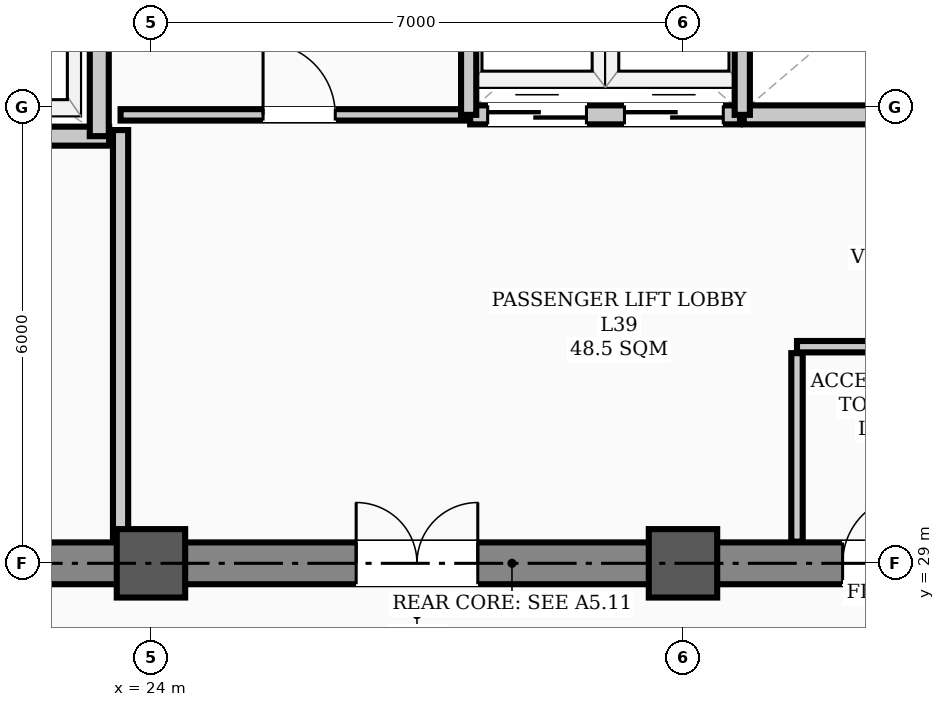
"""IFC4 building model, lengths in metres.
Left out: names, types, materials, properties, quantities, classifications, styles, units other than length and angle.
Written with IfcOpenShell. Run it as: python <this file> out.ifc"""

import sys

from ifc_helpers import new_model, si_unit, direction, frame, frame_2d, origin, origin_2d, place, context, subcontext, project, spatial, rectangle, hollow_rectangle, extrude, element, fill, save


model = new_model("IFC4")
c1 = context("Model", 3, precision=1e-05, world=origin(), true_north=direction((0.0, 1.0)))
c2 = subcontext(c1, "Body", "Model", "MODEL_VIEW")
j1 = project(units=[si_unit("LENGTHUNIT", "METRE"), si_unit("PLANEANGLEUNIT", "RADIAN")], contexts=[c1])
p1 = place(None, origin())
s1 = spatial("IfcSite", under=j1, at=p1, CompositionType="ELEMENT")
p2 = place(p1, origin())
s2 = spatial("IfcBuilding", under=s1, at=p2, CompositionType="ELEMENT")
p3 = place(p2, frame((0.0, 0.0, 157.8)))
s3 = spatial("IfcBuildingStorey", under=s2, at=p3, CompositionType="ELEMENT", Elevation=157.8)
for number, where, z_axis, x_axis in (
    (1, (24.0, 29.0, 0.0), (0.0, 0.0, 1.0), (1.0, 0.0, 0.0)),
    (2, (31.0, 29.0, 0.0), (0.0, 0.0, 1.0), (1.0, 0.0, 0.0)),
):
    element("IfcColumn", number, at=place(p3, frame(where, z_axis=z_axis, x_axis=x_axis)), inside=s3, PredefinedType="COLUMN", context=c2, shape_type="SweptSolid", body=[
        extrude(hollow_rectangle(XDim=0.9, YDim=0.9, WallThickness=0.035, InnerFilletRadius=0.017, OuterFilletRadius=0.052, at=origin_2d()), origin(), (0.0, 0.0, 1.0), 3.9),
    ])
p4 = place(p3, frame((13.5, 29.0, 0.0), z_axis=(0.0, 0.0, 1.0), x_axis=(1.0, 0.0, 0.0)))
e3 = element("IfcWall", 3, at=p4, inside=s3, PredefinedType="SHEAR", context=c2, shape_type="SweptSolid", body=[
    extrude(rectangle(XDim=30.5, YDim=0.55, at=frame_2d((15.25, 0.0))), origin(), (0.0, 0.0, 1.0), 3.72),
])
p5 = place(p4, frame((1.75, 0.0, 0.0)))
e4 = element("IfcOpeningElement", 4, at=p5, cuts=e3, PredefinedType="OPENING", context=c2, shape_type="SweptSolid", body=[
    extrude(rectangle(XDim=1.1, YDim=2.08, at=frame_2d((0.55, 1.04))), frame((0.0, 0.285, 0.0), z_axis=(0.0, -1.0, 0.0), x_axis=(1.0, 0.0, 0.0)), (0.0, 0.0, 1.0), 0.57),
])
p6 = place(p4, frame((26.7, 0.0, 0.0)))
e5 = element("IfcOpeningElement", 5, at=p6, cuts=e3, PredefinedType="OPENING", context=c2, shape_type="SweptSolid", body=[
    extrude(rectangle(XDim=1.1, YDim=2.08, at=frame_2d((0.55, 1.04))), frame((0.0, 0.285, 0.0), z_axis=(0.0, -1.0, 0.0), x_axis=(1.0, 0.0, 0.0)), (0.0, 0.0, 1.0), 0.57),
])
p7 = place(p4, frame((6.8, 0.0, 0.0)))
e6 = element("IfcOpeningElement", 6, at=p7, cuts=e3, PredefinedType="OPENING", context=c2, shape_type="SweptSolid", body=[
    extrude(rectangle(XDim=1.1, YDim=2.08, at=frame_2d((0.55, 1.04))), frame((0.0, 0.285, 0.0), z_axis=(0.0, -1.0, 0.0), x_axis=(1.0, 0.0, 0.0)), (0.0, 0.0, 1.0), 0.57),
])
p8 = place(p4, frame((13.2, 0.0, 0.0)))
e7 = element("IfcOpeningElement", 7, at=p8, cuts=e3, PredefinedType="OPENING", context=c2, shape_type="SweptSolid", body=[
    extrude(rectangle(XDim=1.6, YDim=2.08, at=frame_2d((0.8, 1.04))), frame((0.0, 0.285, 0.0), z_axis=(0.0, -1.0, 0.0), x_axis=(1.0, 0.0, 0.0)), (0.0, 0.0, 1.0), 0.57),
])
p9 = place(p4, frame((19.6, 0.0, 0.0)))
e8 = element("IfcOpeningElement", 8, at=p9, cuts=e3, PredefinedType="OPENING", context=c2, shape_type="SweptSolid", body=[
    extrude(rectangle(XDim=0.9, YDim=2.08, at=frame_2d((0.45, 1.04))), frame((0.0, 0.285, 0.0), z_axis=(0.0, -1.0, 0.0), x_axis=(1.0, 0.0, 0.0)), (0.0, 0.0, 1.0), 0.57),
])
p10 = place(p4, frame((21.6, 0.0, 0.0)))
e9 = element("IfcOpeningElement", 9, at=p10, cuts=e3, PredefinedType="OPENING", context=c2, shape_type="SweptSolid", body=[
    extrude(rectangle(XDim=0.9, YDim=2.08, at=frame_2d((0.45, 1.04))), frame((0.0, 0.285, 0.0), z_axis=(0.0, -1.0, 0.0), x_axis=(1.0, 0.0, 0.0)), (0.0, 0.0, 1.0), 0.57),
])
p11 = place(p3, frame((18.1, 34.62, 0.0), z_axis=(0.0, 0.0, 1.0), x_axis=(1.0, 0.0, 0.0)))
e10 = element("IfcWall", 10, at=p11, inside=s3, PredefinedType="STANDARD", context=c2, shape_type="SweptSolid", body=[
    extrude(rectangle(XDim=5.35, YDim=0.25, at=frame_2d((2.675, 0.0))), origin(), (0.0, 0.0, 1.0), 3.72),
])
p12 = place(p11, frame((0.85, 0.0, 0.0)))
e11 = element("IfcOpeningElement", 11, at=p12, cuts=e10, PredefinedType="OPENING", context=c2, shape_type="SweptSolid", body=[
    extrude(rectangle(XDim=1.1, YDim=2.08, at=frame_2d((0.55, 1.04))), frame((0.0, 0.135, 0.0), z_axis=(0.0, -1.0, 0.0), x_axis=(1.0, 0.0, 0.0)), (0.0, 0.0, 1.0), 0.27),
])
p13 = place(p11, frame((3.45, 0.0, 0.0)))
e12 = element("IfcOpeningElement", 12, at=p13, cuts=e10, PredefinedType="OPENING", context=c2, shape_type="SweptSolid", body=[
    extrude(rectangle(XDim=1.1, YDim=2.08, at=frame_2d((0.55, 1.04))), frame((0.0, 0.135, 0.0), z_axis=(0.0, -1.0, 0.0), x_axis=(1.0, 0.0, 0.0)), (0.0, 0.0, 1.0), 0.27),
])
p14 = place(p3, frame((23.32, 34.62, 0.0), z_axis=(0.0, 0.0, 1.0), x_axis=(0.0, 1.0, 0.0)))
e13 = element("IfcWall", 13, at=p14, inside=s3, PredefinedType="STANDARD", context=c2, shape_type="SweptSolid", body=[
    extrude(rectangle(XDim=3.33, YDim=0.25, at=frame_2d((1.665, 0.0))), origin(), (0.0, 0.0, 1.0), 3.35),
])
p15 = place(p3, frame((28.2, 34.9, 0.0), z_axis=(0.0, 0.0, 1.0), x_axis=(1.0, 0.0, 0.0)))
e14 = element("IfcWall", 14, at=p15, inside=s3, PredefinedType="STANDARD", context=c2, shape_type="SweptSolid", body=[
    extrude(rectangle(XDim=3.55, YDim=0.25, at=frame_2d((1.775, 0.0))), origin(), (0.0, 0.0, 1.0), 3.72),
])
p16 = place(p15, frame((0.23, 0.0, 0.0)))
e15 = element("IfcOpeningElement", 15, at=p16, cuts=e14, PredefinedType="OPENING", context=c2, shape_type="SweptSolid", body=[
    extrude(rectangle(XDim=1.3, YDim=2.08, at=frame_2d((0.65, 1.04))), frame((0.0, 0.135, 0.0), z_axis=(0.0, -1.0, 0.0), x_axis=(1.0, 0.0, 0.0)), (0.0, 0.0, 1.0), 0.27),
])
p17 = place(p15, frame((2.03, 0.0, 0.0)))
e16 = element("IfcOpeningElement", 16, at=p17, cuts=e14, PredefinedType="OPENING", context=c2, shape_type="SweptSolid", body=[
    extrude(rectangle(XDim=1.3, YDim=2.08, at=frame_2d((0.65, 1.04))), frame((0.0, 0.135, 0.0), z_axis=(0.0, -1.0, 0.0), x_axis=(1.0, 0.0, 0.0)), (0.0, 0.0, 1.0), 0.27),
])
p18 = place(p3, frame((31.8, 34.9, 0.0), z_axis=(0.0, 0.0, 1.0), x_axis=(1.0, 0.0, 0.0)))
e17 = element("IfcWall", 17, at=p18, inside=s3, PredefinedType="STANDARD", context=c2, shape_type="SweptSolid", body=[
    extrude(rectangle(XDim=3.6, YDim=0.25, at=frame_2d((1.8, 0.0))), origin(), (0.0, 0.0, 1.0), 3.72),
])
p19 = place(p3, frame((23.6, 34.9, 0.0), z_axis=(0.0, 0.0, 1.0), x_axis=(1.0, 0.0, 0.0)))
e18 = element("IfcWall", 18, at=p19, inside=s3, PredefinedType="PARTITIONING", context=c2, shape_type="SweptSolid", body=[
    extrude(rectangle(XDim=4.58, YDim=0.15, at=frame_2d((2.29, 0.0))), origin(), (0.0, 0.0, 1.0), 3.72),
])
p20 = place(p19, frame((1.875, 0.0, 0.0)))
e19 = element("IfcOpeningElement", 19, at=p20, cuts=e18, PredefinedType="OPENING", context=c2, shape_type="SweptSolid", body=[
    extrude(rectangle(XDim=0.95, YDim=2.08, at=frame_2d((0.475, 1.04))), frame((0.0, 0.085, 0.0), z_axis=(0.0, -1.0, 0.0), x_axis=(1.0, 0.0, 0.0)), (0.0, 0.0, 1.0), 0.17),
])
p21 = place(p3, frame((32.5, 31.85, 0.0), z_axis=(0.0, 0.0, 1.0), x_axis=(1.0, 0.0, 0.0)))
e20 = element("IfcWall", 20, at=p21, inside=s3, PredefinedType="PARTITIONING", context=c2, shape_type="SweptSolid", body=[
    extrude(rectangle(XDim=4.1, YDim=0.15, at=frame_2d((2.05, 0.0))), origin(), (0.0, 0.0, 1.0), 3.72),
])
p22 = place(p3, frame((23.6, 29.285, 0.0), z_axis=(0.0, 0.0, 1.0), x_axis=(0.0, 1.0, 0.0)))
e21 = element("IfcWall", 21, at=p22, inside=s3, PredefinedType="STANDARD", context=c2, shape_type="SweptSolid", body=[
    extrude(rectangle(XDim=5.415, YDim=0.2, at=frame_2d((2.708, 0.0))), origin(), (0.0, 0.0, 1.0), 3.2),
])
p23 = place(p3, frame((32.5, 29.285, 0.0), z_axis=(0.0, 0.0, 1.0), x_axis=(0.0, 1.0, 0.0)))
e22 = element("IfcWall", 22, at=p23, inside=s3, PredefinedType="PARTITIONING", context=c2, shape_type="SweptSolid", body=[
    extrude(rectangle(XDim=2.48, YDim=0.15, at=frame_2d((1.24, 0.0))), origin(), (0.0, 0.0, 1.0), 3.35),
])
for number, where, z_axis, x_axis in (
    (23, (28.18, 34.9, 0.0), (0.0, 0.0, 1.0), (0.0, 1.0, 0.0)),
    (24, (31.78, 34.9, 0.0), (0.0, 0.0, 1.0), (0.0, 1.0, 0.0)),
):
    element("IfcWall", number, at=place(p3, frame(where, z_axis=z_axis, x_axis=x_axis)), inside=s3, PredefinedType="STANDARD", context=c2, shape_type="SweptSolid", body=[
        extrude(rectangle(XDim=3.12, YDim=0.2, at=frame_2d((1.56, 0.0))), origin(), (0.0, 0.0, 1.0), 3.35),
    ])
p24 = place(p8, origin())
e25 = element("IfcDoor", 25, at=p24, inside=s3, OperationType="DOUBLE_DOOR_SINGLE_SWING", PredefinedType="DOOR", context=c2, shape_type="SweptSolid", body=[
    extrude(rectangle(XDim=1.6, YDim=2.08, at=frame_2d((0.8, 1.04))), frame((0.0, 0.025, 0.0), z_axis=(0.0, -1.0, 0.0), x_axis=(1.0, 0.0, 0.0)), (0.0, 0.0, 1.0), 0.05),
])
fill(e7, e25)
p25 = place(p20, origin())
e26 = element("IfcDoor", 26, at=p25, inside=s3, OperationType="SINGLE_SWING_LEFT", PredefinedType="DOOR", context=c2, shape_type="SweptSolid", body=[
    extrude(rectangle(XDim=0.95, YDim=2.08, at=frame_2d((0.475, 1.04))), frame((0.0, 0.025, 0.0), z_axis=(0.0, -1.0, 0.0), x_axis=(1.0, 0.0, 0.0)), (0.0, 0.0, 1.0), 0.05),
])
fill(e19, e26)
p26 = place(p9, origin())
e27 = element("IfcDoor", 27, at=p26, inside=s3, OperationType="SINGLE_SWING_RIGHT", PredefinedType="DOOR", context=c2, shape_type="SweptSolid", body=[
    extrude(rectangle(XDim=0.9, YDim=2.08, at=frame_2d((0.45, 1.04))), frame((0.0, 0.025, 0.0), z_axis=(0.0, -1.0, 0.0), x_axis=(1.0, 0.0, 0.0)), (0.0, 0.0, 1.0), 0.05),
])
fill(e8, e27)
p27 = place(p16, origin())
e28 = element("IfcDoor", 28, at=p27, inside=s3, OperationType="DOUBLE_DOOR_SLIDING", PredefinedType="DOOR", context=c2, shape_type="SweptSolid", body=[
    extrude(rectangle(XDim=1.3, YDim=2.08, at=frame_2d((0.65, 1.04))), frame((0.0, 0.025, 0.0), z_axis=(0.0, -1.0, 0.0), x_axis=(1.0, 0.0, 0.0)), (0.0, 0.0, 1.0), 0.05),
])
fill(e15, e28)
p28 = place(p17, origin())
e29 = element("IfcDoor", 29, at=p28, inside=s3, OperationType="DOUBLE_DOOR_SLIDING", PredefinedType="DOOR", context=c2, shape_type="SweptSolid", body=[
    extrude(rectangle(XDim=1.3, YDim=2.08, at=frame_2d((0.65, 1.04))), frame((0.0, 0.025, 0.0), z_axis=(0.0, -1.0, 0.0), x_axis=(1.0, 0.0, 0.0)), (0.0, 0.0, 1.0), 0.05),
])
fill(e16, e29)
save(model, sys.argv[1])
